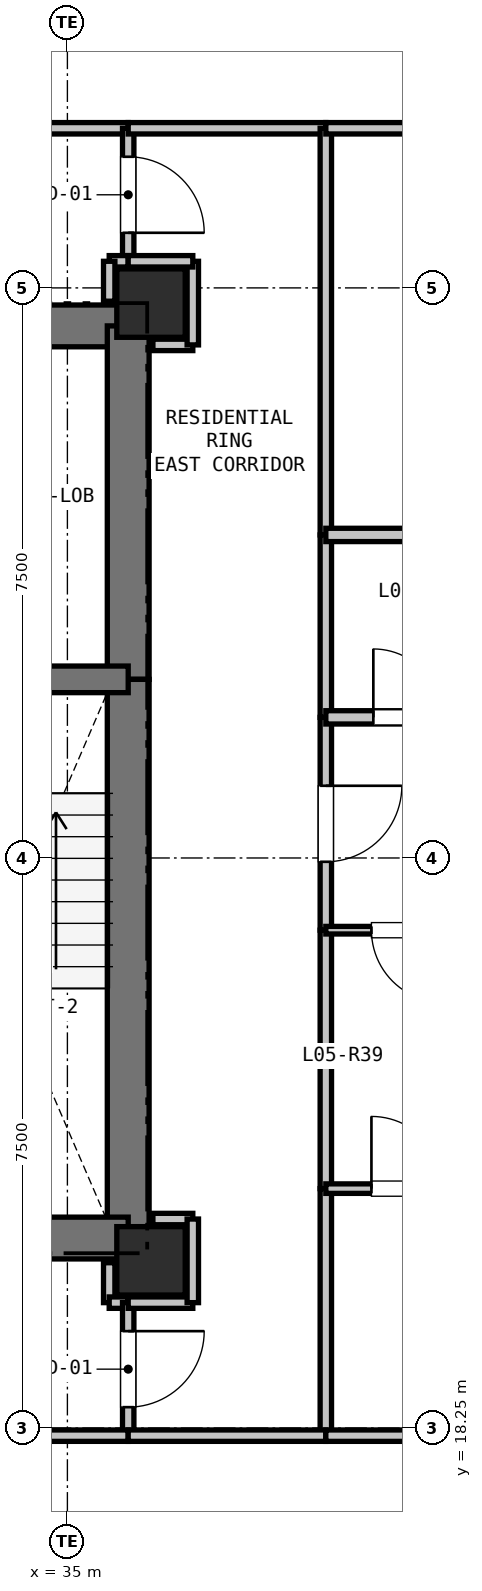
"""IFC4 building model, lengths in metres.
Left out: names, types, materials, properties, quantities, classifications, styles, units other than length and angle.
Written with IfcOpenShell. Run it as: python <this file> out.ifc"""

import sys

from ifc_helpers import new_model, si_unit, direction, frame, frame_2d, origin, origin_2d, place, context, subcontext, project, spatial, rectangle, extrude, element, fill, save


model = new_model("IFC4")
c1 = context("Model", 3, precision=1e-05, world=origin(), true_north=direction((0.0, 1.0)))
c2 = subcontext(c1, "Body", "Model", "MODEL_VIEW")
j1 = project(units=[si_unit("LENGTHUNIT", "METRE"), si_unit("PLANEANGLEUNIT", "RADIAN")], contexts=[c1])
p1 = place(None, origin())
s1 = spatial("IfcSite", under=j1, at=p1, CompositionType="ELEMENT")
p2 = place(p1, origin())
s2 = spatial("IfcBuilding", under=s1, at=p2, CompositionType="ELEMENT")
p3 = place(p2, frame((0.0, 0.0, 22.5)))
s3 = spatial("IfcBuildingStorey", under=s2, at=p3, CompositionType="ELEMENT", Elevation=22.5)
for number, where, z_axis, x_axis in (
    (1, (36.1, 33.05, 0.0), (0.0, 0.0, 1.0), (1.0, 0.0, 0.0)),
    (2, (36.1, 20.45, 0.0), (0.0, 0.0, 1.0), (1.0, 0.0, 0.0)),
):
    element("IfcColumn", number, at=place(p3, frame(where, z_axis=z_axis, x_axis=x_axis)), inside=s3, PredefinedType="COLUMN", context=c2, shape_type="SweptSolid", body=[
        extrude(rectangle(XDim=0.9, YDim=0.9, at=origin_2d()), origin(), (0.0, 0.0, 1.0), 3.3),
    ])
p4 = place(p3, frame((32.35, 32.75, 0.0), z_axis=(0.0, 0.0, 1.0), x_axis=(1.0, 0.0, 0.0)))
e3 = element("IfcWall", 3, at=p4, inside=s3, PredefinedType="SHEAR", context=c2, shape_type="SweptSolid", body=[
    extrude(rectangle(XDim=3.45, YDim=0.55, at=frame_2d((1.725, 0.0))), origin(), (0.0, 0.0, 1.0), 3.04),
])
p5 = place(p4, frame((0.65, 0.0, 0.0)))
e4 = element("IfcOpeningElement", 4, at=p5, cuts=e3, PredefinedType="OPENING", context=c2, shape_type="SweptSolid", body=[
    extrude(rectangle(XDim=1.15, YDim=2.15, at=frame_2d((0.575, 1.075))), frame((0.0, 0.285, 0.0), z_axis=(0.0, -1.0, 0.0), x_axis=(1.0, 0.0, 0.0)), (0.0, 0.0, 1.0), 0.57),
])
p6 = place(p3, frame((35.8, 32.75, 0.0), z_axis=(0.0, 0.0, 1.0), x_axis=(0.0, -1.0, 0.0)))
e5 = element("IfcWall", 5, at=p6, inside=s3, PredefinedType="SHEAR", context=c2, shape_type="SweptSolid", body=[
    extrude(rectangle(XDim=4.65, YDim=0.55, at=frame_2d((2.325, 0.0))), origin(), (0.0, 0.0, 1.0), 3.04),
])
p7 = place(p3, frame((35.8, 28.1, 0.0), z_axis=(0.0, 0.0, 1.0), x_axis=(0.0, -1.0, 0.0)))
e6 = element("IfcWall", 6, at=p7, inside=s3, PredefinedType="SHEAR", context=c2, shape_type="SweptSolid", body=[
    extrude(rectangle(XDim=7.35, YDim=0.55, at=frame_2d((3.675, 0.0))), origin(), (0.0, 0.0, 1.0), 3.04),
])
p8 = place(p3, frame((35.8, 20.75, 0.0), z_axis=(0.0, 0.0, 1.0), x_axis=(-1.0, 0.0, 0.0)))
e7 = element("IfcWall", 7, at=p8, inside=s3, PredefinedType="SHEAR", context=c2, shape_type="SweptSolid", body=[
    extrude(rectangle(XDim=3.45, YDim=0.55, at=frame_2d((1.725, 0.0))), origin(), (0.0, 0.0, 1.0), 3.04),
])
p9 = place(p3, frame((32.35, 28.1, 0.0), z_axis=(0.0, 0.0, 1.0), x_axis=(1.0, 0.0, 0.0)))
e8 = element("IfcWall", 8, at=p9, inside=s3, PredefinedType="SHEAR", context=c2, shape_type="SweptSolid", body=[
    extrude(rectangle(XDim=3.45, YDim=0.35, at=frame_2d((1.725, 0.0))), origin(), (0.0, 0.0, 1.0), 3.04),
])
p10 = place(p9, frame((1.15, 0.0, 0.0)))
e9 = element("IfcOpeningElement", 9, at=p10, cuts=e8, PredefinedType="OPENING", context=c2, shape_type="SweptSolid", body=[
    extrude(rectangle(XDim=1.15, YDim=2.15, at=frame_2d((0.575, 1.075))), frame((0.0, 0.185, 0.0), z_axis=(0.0, -1.0, 0.0), x_axis=(1.0, 0.0, 0.0)), (0.0, 0.0, 1.0), 0.37),
])
p11 = place(p3, frame((35.55, 20.425, 0.0), z_axis=(0.0, 0.0, 1.0), x_axis=(0.0, -1.0, 0.0)))
e10 = element("IfcWall", 10, at=p11, inside=s3, PredefinedType="PARTITIONING", context=c2, shape_type="SweptSolid", body=[
    extrude(rectangle(XDim=0.525, YDim=0.15, at=frame_2d((0.263, 0.0))), origin(), (0.0, 0.0, 1.0), 2.488),
])
p12 = place(p3, frame((35.55, 19.9, 0.0), z_axis=(0.0, 0.0, 1.0), x_axis=(1.0, 0.0, 0.0)))
e11 = element("IfcWall", 11, at=p12, inside=s3, PredefinedType="PARTITIONING", context=c2, shape_type="SweptSolid", body=[
    extrude(rectangle(XDim=0.25, YDim=0.15, at=frame_2d((0.125, 0.0))), origin(), (0.0, 0.0, 1.0), 3.04),
])
p13 = place(p3, frame((35.8, 19.9, 0.0), z_axis=(0.0, 0.0, 1.0), x_axis=(0.0, -1.0, 0.0)))
e12 = element("IfcWall", 12, at=p13, inside=s3, PredefinedType="PARTITIONING", context=c2, shape_type="SweptSolid", body=[
    extrude(rectangle(XDim=1.75, YDim=0.15, at=frame_2d((0.875, 0.0))), origin(), (0.0, 0.0, 1.0), 3.04),
])
p14 = place(p13, frame((0.375, 0.0, 0.0)))
e13 = element("IfcOpeningElement", 13, at=p14, cuts=e12, PredefinedType="OPENING", context=c2, shape_type="SweptSolid", body=[
    extrude(rectangle(XDim=1.0, YDim=2.15, at=frame_2d((0.5, 1.075))), frame((0.0, 0.085, 0.0), z_axis=(0.0, -1.0, 0.0), x_axis=(1.0, 0.0, 0.0)), (0.0, 0.0, 1.0), 0.17),
])
p15 = place(p3, frame((35.8, 18.15, 0.0), z_axis=(0.0, 0.0, 1.0), x_axis=(-1.0, 0.0, 0.0)))
e14 = element("IfcWall", 14, at=p15, inside=s3, PredefinedType="PARTITIONING", context=c2, shape_type="SweptSolid", body=[
    extrude(rectangle(XDim=1.6, YDim=0.15, at=frame_2d((0.8, 0.0))), origin(), (0.0, 0.0, 1.0), 3.04),
])
p16 = place(p3, frame((34.0, 35.35, 0.0), z_axis=(0.0, 0.0, 1.0), x_axis=(1.0, 0.0, 0.0)))
e15 = element("IfcWall", 15, at=p16, inside=s3, PredefinedType="PARTITIONING", context=c2, shape_type="SweptSolid", body=[
    extrude(rectangle(XDim=1.8, YDim=0.15, at=frame_2d((0.9, 0.0))), origin(), (0.0, 0.0, 1.0), 3.04),
])
p17 = place(p3, frame((35.8, 35.35, 0.0), z_axis=(0.0, 0.0, 1.0), x_axis=(0.0, -1.0, 0.0)))
e16 = element("IfcWall", 16, at=p17, inside=s3, PredefinedType="PARTITIONING", context=c2, shape_type="SweptSolid", body=[
    extrude(rectangle(XDim=1.75, YDim=0.15, at=frame_2d((0.875, 0.0))), origin(), (0.0, 0.0, 1.0), 3.04),
])
p18 = place(p17, frame((0.375, 0.0, 0.0)))
e17 = element("IfcOpeningElement", 17, at=p18, cuts=e16, PredefinedType="OPENING", context=c2, shape_type="SweptSolid", body=[
    extrude(rectangle(XDim=1.0, YDim=2.15, at=frame_2d((0.5, 1.075))), frame((0.0, 0.085, 0.0), z_axis=(0.0, -1.0, 0.0), x_axis=(1.0, 0.0, 0.0)), (0.0, 0.0, 1.0), 0.17),
])
p19 = place(p3, frame((35.8, 33.6, 0.0), z_axis=(0.0, 0.0, 1.0), x_axis=(-1.0, 0.0, 0.0)))
e18 = element("IfcWall", 18, at=p19, inside=s3, PredefinedType="PARTITIONING", context=c2, shape_type="SweptSolid", body=[
    extrude(rectangle(XDim=0.25, YDim=0.15, at=frame_2d((0.125, 0.0))), origin(), (0.0, 0.0, 1.0), 3.04),
])
p20 = place(p3, frame((35.55, 33.6, 0.0), z_axis=(0.0, 0.0, 1.0), x_axis=(0.0, -1.0, 0.0)))
e19 = element("IfcWall", 19, at=p20, inside=s3, PredefinedType="PARTITIONING", context=c2, shape_type="SweptSolid", body=[
    extrude(rectangle(XDim=0.525, YDim=0.15, at=frame_2d((0.263, 0.0))), origin(), (0.0, 0.0, 1.0), 2.488),
])
for number, where, z_axis, x_axis in (
    (20, (36.65, 21.0, 0.0), (0.0, 0.0, 1.0), (-1.0, 0.0, 0.0)),
    (21, (36.125, 32.5, 0.0), (0.0, 0.0, 1.0), (1.0, 0.0, 0.0)),
):
    element("IfcWall", number, at=place(p3, frame(where, z_axis=z_axis, x_axis=x_axis)), inside=s3, PredefinedType="PARTITIONING", context=c2, shape_type="SweptSolid", body=[
        extrude(rectangle(XDim=0.525, YDim=0.15, at=frame_2d((0.262, 0.0))), origin(), (0.0, 0.0, 1.0), 2.488),
    ])
p21 = place(p3, frame((36.65, 32.5, 0.0), z_axis=(0.0, 0.0, 1.0), x_axis=(0.0, 1.0, 0.0)))
e22 = element("IfcWall", 22, at=p21, inside=s3, PredefinedType="PARTITIONING", context=c2, shape_type="SweptSolid", body=[
    extrude(rectangle(XDim=1.1, YDim=0.15, at=frame_2d((0.55, 0.0))), origin(), (0.0, 0.0, 1.0), 2.337),
])
p22 = place(p3, frame((36.65, 33.6, 0.0), z_axis=(0.0, 0.0, 1.0), x_axis=(-1.0, 0.0, 0.0)))
e23 = element("IfcWall", 23, at=p22, inside=s3, PredefinedType="PARTITIONING", context=c2, shape_type="SweptSolid", body=[
    extrude(rectangle(XDim=0.85, YDim=0.15, at=frame_2d((0.425, 0.0))), origin(), (0.0, 0.0, 1.0), 2.337),
])
p23 = place(p3, frame((35.8, 35.35, 0.0), z_axis=(0.0, 0.0, 1.0), x_axis=(1.0, 0.0, 0.0)))
e24 = element("IfcWall", 24, at=p23, inside=s3, PredefinedType="PARTITIONING", context=c2, shape_type="SweptSolid", body=[
    extrude(rectangle(XDim=2.6, YDim=0.15, at=frame_2d((1.3, 0.0))), origin(), (0.0, 0.0, 1.0), 2.337),
])
p24 = place(p3, frame((38.4, 35.35, 0.0), z_axis=(0.0, 0.0, 1.0), x_axis=(0.0, -1.0, 0.0)))
e25 = element("IfcWall", 25, at=p24, inside=s3, PredefinedType="PARTITIONING", context=c2, shape_type="SweptSolid", body=[
    extrude(rectangle(XDim=5.35, YDim=0.15, at=frame_2d((2.675, 0.0))), origin(), (0.0, 0.0, 1.0), 2.337),
])
p25 = place(p3, frame((38.4, 30.0, 0.0), z_axis=(0.0, 0.0, 1.0), x_axis=(0.0, -1.0, 0.0)))
e26 = element("IfcWall", 26, at=p25, inside=s3, PredefinedType="PARTITIONING", context=c2, shape_type="SweptSolid", body=[
    extrude(rectangle(XDim=2.4, YDim=0.15, at=frame_2d((1.2, 0.0))), origin(), (0.0, 0.0, 1.0), 3.04),
])
p26 = place(p3, frame((38.4, 27.6, 0.0), z_axis=(0.0, 0.0, 1.0), x_axis=(0.0, -1.0, 0.0)))
e27 = element("IfcWall", 27, at=p26, inside=s3, PredefinedType="PARTITIONING", context=c2, shape_type="SweptSolid", body=[
    extrude(rectangle(XDim=2.8, YDim=0.15, at=frame_2d((1.4, 0.0))), origin(), (0.0, 0.0, 1.0), 3.04),
])
p27 = place(p26, frame((0.9, 0.0, 0.0)))
e28 = element("IfcOpeningElement", 28, at=p27, cuts=e27, PredefinedType="OPENING", context=c2, shape_type="SweptSolid", body=[
    extrude(rectangle(XDim=1.0, YDim=2.15, at=frame_2d((0.5, 1.075))), frame((0.0, 0.085, 0.0), z_axis=(0.0, -1.0, 0.0), x_axis=(1.0, 0.0, 0.0)), (0.0, 0.0, 1.0), 0.17),
])
p28 = place(p3, frame((38.4, 24.8, 0.0), z_axis=(0.0, 0.0, 1.0), x_axis=(0.0, -1.0, 0.0)))
e29 = element("IfcWall", 29, at=p28, inside=s3, PredefinedType="PARTITIONING", context=c2, shape_type="SweptSolid", body=[
    extrude(rectangle(XDim=3.4, YDim=0.15, at=frame_2d((1.7, 0.0))), origin(), (0.0, 0.0, 1.0), 3.04),
])
p29 = place(p3, frame((38.4, 21.4, 0.0), z_axis=(0.0, 0.0, 1.0), x_axis=(0.0, -1.0, 0.0)))
e30 = element("IfcWall", 30, at=p29, inside=s3, PredefinedType="PARTITIONING", context=c2, shape_type="SweptSolid", body=[
    extrude(rectangle(XDim=3.25, YDim=0.15, at=frame_2d((1.625, 0.0))), origin(), (0.0, 0.0, 1.0), 3.04),
])
p30 = place(p3, frame((38.4, 18.15, 0.0), z_axis=(0.0, 0.0, 1.0), x_axis=(-1.0, 0.0, 0.0)))
e31 = element("IfcWall", 31, at=p30, inside=s3, PredefinedType="PARTITIONING", context=c2, shape_type="SweptSolid", body=[
    extrude(rectangle(XDim=2.6, YDim=0.15, at=frame_2d((1.3, 0.0))), origin(), (0.0, 0.0, 1.0), 2.337),
])
p31 = place(p3, frame((35.8, 19.9, 0.0), z_axis=(0.0, 0.0, 1.0), x_axis=(1.0, 0.0, 0.0)))
e32 = element("IfcWall", 32, at=p31, inside=s3, PredefinedType="PARTITIONING", context=c2, shape_type="SweptSolid", body=[
    extrude(rectangle(XDim=0.85, YDim=0.15, at=frame_2d((0.425, 0.0))), origin(), (0.0, 0.0, 1.0), 2.337),
])
p32 = place(p3, frame((36.65, 19.9, 0.0), z_axis=(0.0, 0.0, 1.0), x_axis=(0.0, 1.0, 0.0)))
e33 = element("IfcWall", 33, at=p32, inside=s3, PredefinedType="PARTITIONING", context=c2, shape_type="SweptSolid", body=[
    extrude(rectangle(XDim=1.1, YDim=0.15, at=frame_2d((0.55, 0.0))), origin(), (0.0, 0.0, 1.0), 3.04),
])
p33 = place(p3, frame((40.55, 24.8, 0.0), z_axis=(0.0, 0.0, 1.0), x_axis=(-1.0, 0.0, 0.0)))
e34 = element("IfcWall", 34, at=p33, inside=s3, PredefinedType="PARTITIONING", context=c2, shape_type="SweptSolid", body=[
    extrude(rectangle(XDim=2.15, YDim=0.1, at=frame_2d((1.075, 0.0))), origin(), (0.0, 0.0, 1.0), 3.04),
])
p34 = place(p33, frame((0.6, 0.0, 0.0)))
e35 = element("IfcOpeningElement", 35, at=p34, cuts=e34, PredefinedType="OPENING", context=c2, shape_type="SweptSolid", body=[
    extrude(rectangle(XDim=0.95, YDim=2.1, at=frame_2d((0.475, 1.05))), frame((0.0, 0.06, 0.0), z_axis=(0.0, -1.0, 0.0), x_axis=(1.0, 0.0, 0.0)), (0.0, 0.0, 1.0), 0.12),
])
p35 = place(p3, frame((38.4, 27.6, 0.0), z_axis=(0.0, 0.0, 1.0), x_axis=(1.0, 0.0, 0.0)))
e36 = element("IfcWall", 36, at=p35, inside=s3, PredefinedType="PLUMBINGWALL", context=c2, shape_type="SweptSolid", body=[
    extrude(rectangle(XDim=2.15, YDim=0.175, at=frame_2d((1.075, 0.0))), origin(), (0.0, 0.0, 1.0), 3.04),
])
p36 = place(p35, frame((0.625, 0.0, 0.0)))
e37 = element("IfcOpeningElement", 37, at=p36, cuts=e36, PredefinedType="OPENING", context=c2, shape_type="SweptSolid", body=[
    extrude(rectangle(XDim=0.9, YDim=2.1, at=frame_2d((0.45, 1.05))), frame((0.0, 0.097, 0.0), z_axis=(0.0, -1.0, 0.0), x_axis=(1.0, 0.0, 0.0)), (0.0, 0.0, 1.0), 0.195),
])
p37 = place(p3, frame((38.4, 18.15, 0.0), z_axis=(0.0, 0.0, 1.0), x_axis=(1.0, 0.0, 0.0)))
e38 = element("IfcWall", 38, at=p37, inside=s3, PredefinedType="PARTITIONING", context=c2, shape_type="SweptSolid", body=[
    extrude(rectangle(XDim=5.289, YDim=0.15, at=frame_2d((2.644, 0.0))), origin(), (0.0, 0.0, 1.0), 2.365),
])
p38 = place(p3, frame((38.4, 30.0, 0.0), z_axis=(0.0, 0.0, 1.0), x_axis=(1.0, 0.0, 0.0)))
e39 = element("IfcWall", 39, at=p38, inside=s3, PredefinedType="PLUMBINGWALL", context=c2, shape_type="SweptSolid", body=[
    extrude(rectangle(XDim=2.15, YDim=0.175, at=frame_2d((1.075, 0.0))), origin(), (0.0, 0.0, 1.0), 3.04),
])
p39 = place(p3, frame((38.4, 21.4, 0.0), z_axis=(0.0, 0.0, 1.0), x_axis=(1.0, 0.0, 0.0)))
e40 = element("IfcWall", 40, at=p39, inside=s3, PredefinedType="PARTITIONING", context=c2, shape_type="SweptSolid", body=[
    extrude(rectangle(XDim=2.15, YDim=0.125, at=frame_2d((1.075, 0.0))), origin(), (0.0, 0.0, 1.0), 3.04),
])
p40 = place(p39, frame((0.6, 0.0, 0.0)))
e41 = element("IfcOpeningElement", 41, at=p40, cuts=e40, PredefinedType="OPENING", context=c2, shape_type="SweptSolid", body=[
    extrude(rectangle(XDim=0.95, YDim=2.1, at=frame_2d((0.475, 1.05))), frame((0.0, 0.073, 0.0), z_axis=(0.0, -1.0, 0.0), x_axis=(1.0, 0.0, 0.0)), (0.0, 0.0, 1.0), 0.145),
])
p41 = place(p3, frame((43.688, 35.35, 0.0), z_axis=(0.0, 0.0, 1.0), x_axis=(-1.0, 0.0, 0.0)))
e42 = element("IfcWall", 42, at=p41, inside=s3, PredefinedType="PARTITIONING", context=c2, shape_type="SweptSolid", body=[
    extrude(rectangle(XDim=5.289, YDim=0.15, at=frame_2d((2.644, 0.0))), origin(), (0.0, 0.0, 1.0), 2.337),
])
p42 = place(p14, origin())
e43 = element("IfcDoor", 43, at=p42, inside=s3, OperationType="SINGLE_SWING_LEFT", PredefinedType="DOOR", context=c2, shape_type="SweptSolid", body=[
    extrude(rectangle(XDim=1.0, YDim=2.15, at=frame_2d((0.5, 1.075))), frame((0.0, 0.025, 0.0), z_axis=(0.0, -1.0, 0.0), x_axis=(1.0, 0.0, 0.0)), (0.0, 0.0, 1.0), 0.05),
])
fill(e13, e43)
p43 = place(p18, origin())
e44 = element("IfcDoor", 44, at=p43, inside=s3, OperationType="SINGLE_SWING_RIGHT", PredefinedType="DOOR", context=c2, shape_type="SweptSolid", body=[
    extrude(rectangle(XDim=1.0, YDim=2.15, at=frame_2d((0.5, 1.075))), frame((0.0, 0.025, 0.0), z_axis=(0.0, -1.0, 0.0), x_axis=(1.0, 0.0, 0.0)), (0.0, 0.0, 1.0), 0.05),
])
fill(e17, e44)
p44 = place(p27, origin())
e45 = element("IfcDoor", 45, at=p44, inside=s3, OperationType="SINGLE_SWING_LEFT", PredefinedType="DOOR", context=c2, shape_type="SweptSolid", body=[
    extrude(rectangle(XDim=1.0, YDim=2.15, at=frame_2d((0.5, 1.075))), frame((0.0, 0.025, 0.0), z_axis=(0.0, -1.0, 0.0), x_axis=(1.0, 0.0, 0.0)), (0.0, 0.0, 1.0), 0.05),
])
fill(e28, e45)
p45 = place(p36, origin())
e46 = element("IfcDoor", 46, at=p45, inside=s3, OperationType="SINGLE_SWING_LEFT", PredefinedType="DOOR", context=c2, shape_type="SweptSolid", body=[
    extrude(rectangle(XDim=0.9, YDim=2.1, at=frame_2d((0.45, 1.05))), frame((0.0, 0.025, 0.0), z_axis=(0.0, -1.0, 0.0), x_axis=(1.0, 0.0, 0.0)), (0.0, 0.0, 1.0), 0.05),
])
fill(e37, e46)
p46 = place(p34, origin())
e47 = element("IfcDoor", 47, at=p46, inside=s3, OperationType="SINGLE_SWING_LEFT", PredefinedType="DOOR", context=c2, shape_type="SweptSolid", body=[
    extrude(rectangle(XDim=0.95, YDim=2.1, at=frame_2d((0.475, 1.05))), frame((0.0, 0.025, 0.0), z_axis=(0.0, -1.0, 0.0), x_axis=(1.0, 0.0, 0.0)), (0.0, 0.0, 1.0), 0.05),
])
fill(e35, e47)
p47 = place(p40, origin())
e48 = element("IfcDoor", 48, at=p47, inside=s3, OperationType="SINGLE_SWING_LEFT", PredefinedType="DOOR", context=c2, shape_type="SweptSolid", body=[
    extrude(rectangle(XDim=0.95, YDim=2.1, at=frame_2d((0.475, 1.05))), frame((0.0, 0.025, 0.0), z_axis=(0.0, -1.0, 0.0), x_axis=(1.0, 0.0, 0.0)), (0.0, 0.0, 1.0), 0.05),
])
fill(e41, e48)
save(model, sys.argv[1])
